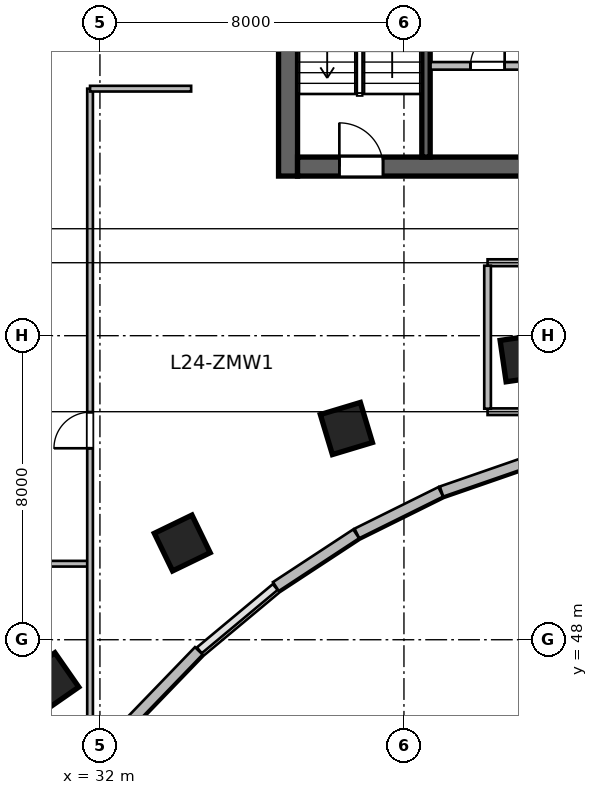
"""IFC4 building model, lengths in metres.
Left out: names, types, materials, properties, quantities, classifications, styles, units other than length and angle.
Written with IfcOpenShell. Run it as: python <this file> out.ifc"""

import sys

from ifc_helpers import new_model, si_unit, direction, frame, frame_2d, origin, origin_2d, place, context, subcontext, project, spatial, rectangle, extrude, source, transform, mapped, element, fill, save


model = new_model("IFC4")
c1 = context("Model", 3, precision=1e-05, world=origin(), true_north=direction((0.0, 1.0)))
c2 = subcontext(c1, "Body", "Model", "MODEL_VIEW")
j1 = project(units=[si_unit("LENGTHUNIT", "METRE"), si_unit("PLANEANGLEUNIT", "RADIAN")], contexts=[c1])
p1 = place(None, origin())
s1 = spatial("IfcSite", under=j1, at=p1, CompositionType="ELEMENT")
p2 = place(p1, origin())
s2 = spatial("IfcBuilding", under=s1, at=p2, CompositionType="ELEMENT")
p3 = place(p2, frame((0.0, 0.0, 103.8)))
s3 = spatial("IfcBuildingStorey", under=s2, at=p3, CompositionType="ELEMENT", Elevation=103.8)
m1 = source(origin(), c2, "Body", "SweptSolid", [
    extrude(rectangle(XDim=12.0, YDim=0.5, at=frame_2d((6.0, 0.0))), origin(), (0.0, 0.0, 1.0), 3.9),
])
p4 = place(p3, frame((36.95, 60.2, 0.0), z_axis=(0.0, 0.0, 1.0), x_axis=(0.0, 1.0, 0.0)))
e1 = element("IfcWall", 1, at=p4, inside=s3, PredefinedType="SHEAR", context=c2, shape_type="MappedRepresentation", body=[
    mapped(m1, transform((0.0, 0.0, 0.0), scale=1.0)),
])
m2 = source(origin(), c2, "Body", "SweptSolid", [
    extrude(rectangle(XDim=21.6, YDim=0.5, at=frame_2d((10.8, 0.0))), origin(), (0.0, 0.0, 1.0), 3.9),
])
p5 = place(p3, frame((37.2, 60.45, 0.0), z_axis=(0.0, 0.0, 1.0), x_axis=(1.0, 0.0, 0.0)))
e2 = element("IfcWall", 2, at=p5, inside=s3, PredefinedType="SHEAR", context=c2, shape_type="MappedRepresentation", body=[
    mapped(m2, transform((0.0, 0.0, 0.0), scale=1.0)),
])
p6 = place(p5, frame((1.1, 0.0, 0.0)))
e3 = element("IfcOpeningElement", 3, at=p6, cuts=e2, PredefinedType="OPENING", context=c2, shape_type="SweptSolid", body=[
    extrude(rectangle(XDim=1.15, YDim=2.15, at=frame_2d((0.575, 1.075))), frame((0.0, 0.26, 0.0), z_axis=(0.0, -1.0, 0.0), x_axis=(1.0, 0.0, 0.0)), (0.0, 0.0, 1.0), 0.52),
])
p7 = place(p5, frame((19.5, 0.0, 0.0)))
e4 = element("IfcOpeningElement", 4, at=p7, cuts=e2, PredefinedType="OPENING", context=c2, shape_type="SweptSolid", body=[
    extrude(rectangle(XDim=0.9, YDim=2.1, at=frame_2d((0.45, 1.05))), frame((0.0, 0.26, 0.0), z_axis=(0.0, -1.0, 0.0), x_axis=(1.0, 0.0, 0.0)), (0.0, 0.0, 1.0), 0.52),
])
p8 = place(p5, frame((12.02, 0.0, 0.0)))
e5 = element("IfcOpeningElement", 5, at=p8, cuts=e2, PredefinedType="OPENING", context=c2, shape_type="SweptSolid", body=[
    extrude(rectangle(XDim=1.6, YDim=2.15, at=frame_2d((0.8, 1.075))), frame((0.0, 0.26, 0.0), z_axis=(0.0, -1.0, 0.0), x_axis=(1.0, 0.0, 0.0)), (0.0, 0.0, 1.0), 0.52),
])
m3 = source(origin(), c2, "Body", "SweptSolid", [
    extrude(rectangle(XDim=11.0, YDim=0.22, at=frame_2d((5.5, 0.0))), origin(), (0.0, 0.0, 1.0), 3.9),
])
p9 = place(p3, frame((40.58, 60.7, 0.0), z_axis=(0.0, 0.0, 1.0), x_axis=(0.0, 1.0, 0.0)))
e6 = element("IfcWall", 6, at=p9, inside=s3, PredefinedType="SHEAR", context=c2, shape_type="MappedRepresentation", body=[
    mapped(m3, transform((0.0, 0.0, 0.0), scale=1.0)),
])
m4 = source(origin(), c2, "Body", "SweptSolid", [
    extrude(rectangle(XDim=1.1, YDim=1.1, at=origin_2d()), origin(), (0.0, 0.0, 1.0), 3.9),
])
for number, where, z_axis, x_axis in (
    (7, (30.677, 46.892, 0.0), (0.0, 0.0, 1.0), (-0.571, 0.821, 0.0)),
    (8, (34.166, 50.545, 0.0), (0.0, 0.0, 1.0), (-0.436, 0.9, 0.0)),
    (9, (38.485, 53.558, 0.0), (0.0, 0.0, 1.0), (-0.289, 0.957, 0.0)),
    (10, (43.154, 55.411, 0.0), (0.0, 0.0, 1.0), (-0.143, 0.99, 0.0)),
):
    element("IfcColumn", number, at=place(p3, frame(where, z_axis=z_axis, x_axis=x_axis)), inside=s3, PredefinedType="COLUMN", context=c2, shape_type="MappedRepresentation", body=[
        mapped(m4, transform((0.0, 0.0, 0.0), scale=1.0)),
    ])
m5 = source(origin(), c2, "Body", "SweptSolid", [
    extrude(rectangle(XDim=2.411, YDim=0.28, at=frame_2d((1.205, 0.0))), origin(), (0.0, 0.0, 1.0), 3.65),
])
p10 = place(p3, frame((43.266, 52.689, 0.0), z_axis=(0.0, 0.0, 1.0), x_axis=(-0.944880068161, -0.327416640982, 0.0)))
e11 = element("IfcWall", 11, at=p10, inside=s3, PredefinedType="SOLIDWALL", context=c2, shape_type="MappedRepresentation", body=[
    mapped(m5, transform((0.0, 0.0, 0.0), scale=1.0)),
])
m6 = source(origin(), c2, "Body", "SweptSolid", [
    extrude(rectangle(XDim=2.462, YDim=0.28, at=frame_2d((1.231, 0.0))), origin(), (0.0, 0.0, 1.0), 3.65),
])
p11 = place(p3, frame((40.967, 51.891, 0.0), z_axis=(0.0, 0.0, 1.0), x_axis=(-0.8959882207, -0.444077817917, 0.0)))
e12 = element("IfcWall", 12, at=p11, inside=s3, PredefinedType="SOLIDWALL", context=c2, shape_type="MappedRepresentation", body=[
    mapped(m6, transform((0.0, 0.0, 0.0), scale=1.0)),
])
m7 = source(origin(), c2, "Body", "SweptSolid", [
    extrude(rectangle(XDim=2.527, YDim=0.28, at=frame_2d((1.264, 0.0))), origin(), (0.0, 0.0, 1.0), 3.65),
])
p12 = place(p3, frame((38.742, 50.786, 0.0), z_axis=(0.0, 0.0, 1.0), x_axis=(-0.836011905051, -0.548711303523, 0.0)))
e13 = element("IfcWall", 13, at=p12, inside=s3, PredefinedType="SOLIDWALL", context=c2, shape_type="MappedRepresentation", body=[
    mapped(m7, transform((0.0, 0.0, 0.0), scale=1.0)),
])
m8 = source(origin(), c2, "Body", "SweptSolid", [
    extrude(rectangle(XDim=2.68, YDim=0.28, at=frame_2d((1.34, 0.0))), origin(), (0.0, 0.0, 1.0), 3.65),
])
p13 = place(p3, frame((34.601, 47.708, 0.0), z_axis=(0.0, 0.0, 1.0), x_axis=(-0.694561996568, -0.719432855049, 0.0)))
e14 = element("IfcWall", 14, at=p13, inside=s3, PredefinedType="SOLIDWALL", context=c2, shape_type="MappedRepresentation", body=[
    mapped(m8, transform((0.0, 0.0, 0.0), scale=1.0)),
])
m9 = source(origin(), c2, "Body", "SweptSolid", [
    extrude(rectangle(XDim=8.02, YDim=0.2, at=frame_2d((4.01, 0.0))), origin(), (0.0, 0.0, 1.0), 3.65),
])
p14 = place(p3, frame((40.7, 63.1, 0.0), z_axis=(0.0, 0.0, 1.0), x_axis=(1.0, 0.0, 0.0)))
e15 = element("IfcWall", 15, at=p14, inside=s3, PredefinedType="SOLIDWALL", context=c2, shape_type="MappedRepresentation", body=[
    mapped(m9, transform((0.0, 0.0, 0.0), scale=1.0)),
])
p15 = place(p14, frame((1.05, 0.0, 0.0)))
e16 = element("IfcOpeningElement", 16, at=p15, cuts=e15, PredefinedType="OPENING", context=c2, shape_type="SweptSolid", body=[
    extrude(rectangle(XDim=0.9, YDim=2.1, at=frame_2d((0.45, 1.05))), frame((0.0, 0.11, 0.0), z_axis=(0.0, -1.0, 0.0), x_axis=(1.0, 0.0, 0.0)), (0.0, 0.0, 1.0), 0.22),
])
p16 = place(p14, frame((4.99, 0.0, 0.0)))
e17 = element("IfcOpeningElement", 17, at=p16, cuts=e15, PredefinedType="OPENING", context=c2, shape_type="SweptSolid", body=[
    extrude(rectangle(XDim=0.9, YDim=2.1, at=frame_2d((0.45, 1.05))), frame((0.0, 0.11, 0.0), z_axis=(0.0, -1.0, 0.0), x_axis=(1.0, 0.0, 0.0)), (0.0, 0.0, 1.0), 0.22),
])
m10 = source(origin(), c2, "Body", "SweptSolid", [
    extrude(rectangle(XDim=4.176, YDim=0.175, at=frame_2d((2.088, 0.0))), origin(), (0.0, 0.0, 1.0), 3.65),
])
p17 = place(p3, frame((42.2, 54.0, 0.0), z_axis=(0.0, 0.0, 1.0), x_axis=(1.0, 0.0, 0.0)))
e18 = element("IfcWall", 18, at=p17, inside=s3, PredefinedType="PARTITIONING", context=c2, shape_type="MappedRepresentation", body=[
    mapped(m10, transform((0.0, 0.0, 0.0), scale=1.0)),
])
m11 = source(origin(), c2, "Body", "SweptSolid", [
    extrude(rectangle(XDim=4.176, YDim=0.18, at=frame_2d((2.088, 0.0))), origin(), (0.0, 0.0, 1.0), 3.65),
])
p18 = place(p3, frame((42.2, 57.92, 0.0), z_axis=(0.0, 0.0, 1.0), x_axis=(1.0, 0.0, 0.0)))
e19 = element("IfcWall", 19, at=p18, inside=s3, PredefinedType="PLUMBINGWALL", context=c2, shape_type="MappedRepresentation", body=[
    mapped(m11, transform((0.0, 0.0, 0.0), scale=1.0)),
])
p19 = place(p18, frame((1.638, 0.0, 0.0)))
e20 = element("IfcOpeningElement", 20, at=p19, cuts=e19, PredefinedType="OPENING", context=c2, shape_type="SweptSolid", body=[
    extrude(rectangle(XDim=0.9, YDim=2.08, at=frame_2d((0.45, 1.04))), frame((0.0, 0.1, 0.0), z_axis=(0.0, -1.0, 0.0), x_axis=(1.0, 0.0, 0.0)), (0.0, 0.0, 1.0), 0.2),
])
m12 = source(origin(), c2, "Body", "SweptSolid", [
    extrude(rectangle(XDim=3.763, YDim=0.175, at=frame_2d((1.881, 0.0))), origin(), (0.0, 0.0, 1.0), 3.65),
])
p20 = place(p3, frame((42.2, 54.079, 0.0), z_axis=(0.0, 0.0, 1.0), x_axis=(0.0, 1.0, 0.0)))
e21 = element("IfcWall", 21, at=p20, inside=s3, PredefinedType="PARTITIONING", context=c2, shape_type="MappedRepresentation", body=[
    mapped(m12, transform((0.0, 0.0, 0.0), scale=1.0)),
])
m13 = source(origin(), c2, "Body", "SweptSolid", [
    extrude(rectangle(XDim=2.5, YDim=0.15, at=frame_2d((1.25, 0.0))), origin(), (0.0, 0.0, 1.0), 3.65),
])
p21 = place(p3, frame((29.2, 50.0, 0.0), z_axis=(0.0, 0.0, 1.0), x_axis=(1.0, 0.0, 0.0)))
e22 = element("IfcWall", 22, at=p21, inside=s3, PredefinedType="PARTITIONING", context=c2, shape_type="MappedRepresentation", body=[
    mapped(m13, transform((0.0, 0.0, 0.0), scale=1.0)),
])
m14 = source(origin(), c2, "Body", "SweptSolid", [
    extrude(rectangle(XDim=17.974, YDim=0.15, at=frame_2d((8.987, 0.0))), origin(), (0.0, 0.0, 1.0), 2.942),
])
p22 = place(p3, frame((31.74, 44.526, 0.0), z_axis=(0.0, 0.0, 1.0), x_axis=(0.0, 1.0, 0.0)))
e23 = element("IfcWall", 23, at=p22, inside=s3, PredefinedType="PARTITIONING", context=c2, shape_type="MappedRepresentation", body=[
    mapped(m14, transform((0.0, 0.0, 0.0), scale=1.0)),
])
p23 = place(p22, frame((8.512, 0.0, 0.0)))
e24 = element("IfcOpeningElement", 24, at=p23, cuts=e23, PredefinedType="OPENING", context=c2, shape_type="SweptSolid", body=[
    extrude(rectangle(XDim=0.95, YDim=2.1, at=frame_2d((0.475, 1.05))), frame((0.0, 0.085, 0.0), z_axis=(0.0, -1.0, 0.0), x_axis=(1.0, 0.0, 0.0)), (0.0, 0.0, 1.0), 0.17),
])
m15 = source(origin(), c2, "Body", "SweptSolid", [
    extrude(rectangle(XDim=2.66, YDim=0.15, at=frame_2d((1.33, 0.0))), origin(), (0.0, 0.0, 1.0), 3.65),
])
p24 = place(p3, frame((31.74, 62.5, 0.0), z_axis=(0.0, 0.0, 1.0), x_axis=(1.0, 0.0, 0.0)))
e25 = element("IfcWall", 25, at=p24, inside=s3, PredefinedType="PARTITIONING", context=c2, shape_type="MappedRepresentation", body=[
    mapped(m15, transform((0.0, 0.0, 0.0), scale=1.0)),
])
m16 = source(origin(), c2, "Body", "SweptSolid", [
    extrude(rectangle(XDim=1.15, YDim=2.15, at=frame_2d((0.575, 1.075))), frame((0.0, 0.025, 0.0), z_axis=(0.0, -1.0, 0.0), x_axis=(1.0, 0.0, 0.0)), (0.0, 0.0, 1.0), 0.05),
])
p25 = place(p6, origin())
e26 = element("IfcDoor", 26, at=p25, inside=s3, OperationType="SINGLE_SWING_LEFT", PredefinedType="DOOR", context=c2, shape_type="MappedRepresentation", body=[
    mapped(m16, transform((0.0, 0.0, 0.0), scale=1.0)),
])
fill(e3, e26)
m17 = source(origin(), c2, "Body", "SweptSolid", [
    extrude(rectangle(XDim=0.9, YDim=2.1, at=frame_2d((0.45, 1.05))), frame((0.0, 0.025, 0.0), z_axis=(0.0, -1.0, 0.0), x_axis=(1.0, 0.0, 0.0)), (0.0, 0.0, 1.0), 0.05),
])
p26 = place(p15, origin())
e27 = element("IfcDoor", 27, at=p26, inside=s3, OperationType="SINGLE_SWING_RIGHT", PredefinedType="DOOR", context=c2, shape_type="MappedRepresentation", body=[
    mapped(m17, transform((0.0, 0.0, 0.0), scale=1.0)),
])
fill(e16, e27)
m18 = source(origin(), c2, "Body", "SweptSolid", [
    extrude(rectangle(XDim=0.95, YDim=2.1, at=frame_2d((0.475, 1.05))), frame((0.0, 0.025, 0.0), z_axis=(0.0, -1.0, 0.0), x_axis=(1.0, 0.0, 0.0)), (0.0, 0.0, 1.0), 0.05),
])
p27 = place(p23, origin())
e28 = element("IfcDoor", 28, at=p27, inside=s3, OperationType="SINGLE_SWING_LEFT", PredefinedType="DOOR", context=c2, shape_type="MappedRepresentation", body=[
    mapped(m18, transform((0.0, 0.0, 0.0), scale=1.0)),
])
fill(e24, e28)
save(model, sys.argv[1])
